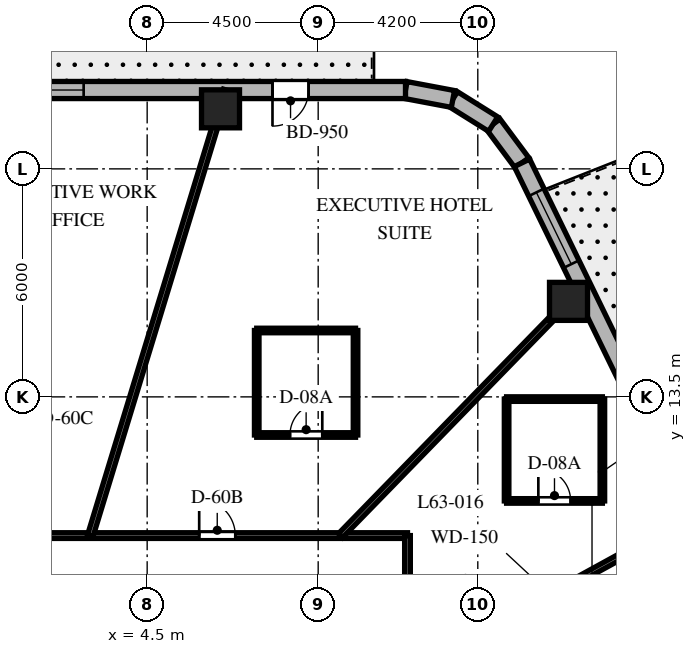
"""IFC4 building model, lengths in metres.
Left out: names, types, materials, properties, quantities, classifications, styles, units other than length and angle.
Written with IfcOpenShell. Run it as: python <this file> out.ifc"""

import sys

from ifc_helpers import new_model, si_unit, direction, frame, frame_2d, origin, origin_2d, place, context, subcontext, project, spatial, rectangle, extrude, element, fill, save


model = new_model("IFC4")
c1 = context("Model", 3, precision=1e-05, world=origin(), true_north=direction((0.0, 1.0)))
c2 = subcontext(c1, "Body", "Model", "MODEL_VIEW")
j1 = project(units=[si_unit("LENGTHUNIT", "METRE"), si_unit("PLANEANGLEUNIT", "RADIAN")], contexts=[c1])
p1 = place(None, origin())
s1 = spatial("IfcSite", under=j1, at=p1, CompositionType="ELEMENT")
p2 = place(p1, origin())
s2 = spatial("IfcBuilding", under=s1, at=p2, CompositionType="ELEMENT")
p3 = place(p2, frame((0.0, 0.0, 252.1)))
s3 = spatial("IfcBuildingStorey", under=s2, at=p3, CompositionType="ELEMENT", Elevation=252.1)
for number, where, z_axis, x_axis in (
    (1, (15.587, 16.013, 0.0), (0.0, 0.0, 1.0), (1.0, 0.0, 0.0)),
    (2, (6.43, 21.08, 0.0), (0.0, 0.0, 1.0), (1.0, 0.0, 0.0)),
):
    element("IfcColumn", number, at=place(p3, frame(where, z_axis=z_axis, x_axis=x_axis)), inside=s3, PredefinedType="COLUMN", context=c2, shape_type="SweptSolid", body=[
        extrude(rectangle(XDim=1.0, YDim=1.0, at=origin_2d()), origin(), (0.0, 0.0, 1.0), 3.8),
    ])
p4 = place(p3, frame((14.362, 19.658, 0.0), z_axis=(0.0, 0.0, 1.0), x_axis=(-0.596642462792, 0.80250717853, 0.0)))
e3 = element("IfcWall", 3, at=p4, inside=s3, PredefinedType="SOLIDWALL", context=c2, shape_type="SweptSolid", body=[
    extrude(rectangle(XDim=1.27, YDim=0.45, at=frame_2d((0.635, 0.0))), origin(), (0.0, 0.0, 1.0), 3.48),
])
p5 = place(p3, frame((13.604, 20.678, 0.0), z_axis=(0.0, 0.0, 1.0), x_axis=(-0.847910404124, 0.53013955387, 0.0)))
e4 = element("IfcWall", 4, at=p5, inside=s3, PredefinedType="SOLIDWALL", context=c2, shape_type="SweptSolid", body=[
    extrude(rectangle(XDim=1.249, YDim=0.45, at=frame_2d((0.624, 0.0))), origin(), (0.0, 0.0, 1.0), 3.48),
])
p6 = place(p3, frame((12.546, 21.34, 0.0), z_axis=(0.0, 0.0, 1.0), x_axis=(-0.982686750835, 0.18527479519, 0.0)))
e5 = element("IfcWall", 5, at=p6, inside=s3, PredefinedType="SOLIDWALL", context=c2, shape_type="SweptSolid", body=[
    extrude(rectangle(XDim=1.27, YDim=0.45, at=frame_2d((0.635, 0.0))), origin(), (0.0, 0.0, 1.0), 3.48),
])
p7 = place(p3, frame((22.74, 2.452, 0.0), z_axis=(0.0, 0.0, 1.0), x_axis=(-0.437753424814, 0.899095066755, 0.0)))
e6 = element("IfcWall", 6, at=p7, inside=s3, PredefinedType="SOLIDWALL", context=c2, shape_type="SweptSolid", body=[
    extrude(rectangle(XDim=19.137, YDim=0.45, at=frame_2d((9.569, 0.0))), origin(), (0.0, 0.0, 1.0), 3.48),
])
p8 = place(p7, frame((4.763, 0.0, 0.0)))
e7 = element("IfcOpeningElement", 7, at=p8, cuts=e6, PredefinedType="OPENING", context=c2, shape_type="SweptSolid", body=[
    extrude(rectangle(XDim=1.0, YDim=2.15, at=frame_2d((0.5, 1.075))), frame((0.0, 0.235, 0.0), z_axis=(0.0, -1.0, 0.0), x_axis=(1.0, 0.0, 0.0)), (0.0, 0.0, 1.0), 0.47),
])
p9 = place(p7, frame((6.611, 0.0, 0.8)))
e8 = element("IfcOpeningElement", 8, at=p9, cuts=e6, PredefinedType="OPENING", context=c2, shape_type="SweptSolid", body=[
    extrude(rectangle(XDim=1.2, YDim=1.8, at=frame_2d((0.6, 0.9))), frame((0.0, 0.235, 0.0), z_axis=(0.0, -1.0, 0.0), x_axis=(1.0, 0.0, 0.0)), (0.0, 0.0, 1.0), 0.47),
])
p10 = place(p7, frame((10.856, 0.0, 0.8)))
e9 = element("IfcOpeningElement", 9, at=p10, cuts=e6, PredefinedType="OPENING", context=c2, shape_type="SweptSolid", body=[
    extrude(rectangle(XDim=2.1, YDim=1.85, at=frame_2d((1.05, 0.925))), frame((0.0, 0.235, 0.0), z_axis=(0.0, -1.0, 0.0), x_axis=(1.0, 0.0, 0.0)), (0.0, 0.0, 1.0), 0.47),
])
p11 = place(p7, frame((16.173, 0.0, 0.8)))
e10 = element("IfcOpeningElement", 10, at=p11, cuts=e6, PredefinedType="OPENING", context=c2, shape_type="SweptSolid", body=[
    extrude(rectangle(XDim=2.1, YDim=1.85, at=frame_2d((1.05, 0.925))), frame((0.0, 0.235, 0.0), z_axis=(0.0, -1.0, 0.0), x_axis=(1.0, 0.0, 0.0)), (0.0, 0.0, 1.0), 0.47),
])
p12 = place(p7, frame((0.916, 0.0, 0.8)))
e11 = element("IfcOpeningElement", 11, at=p12, cuts=e6, PredefinedType="OPENING", context=c2, shape_type="SweptSolid", body=[
    extrude(rectangle(XDim=2.1, YDim=1.85, at=frame_2d((1.05, 0.925))), frame((0.0, 0.235, 0.0), z_axis=(0.0, -1.0, 0.0), x_axis=(1.0, 0.0, 0.0)), (0.0, 0.0, 1.0), 0.47),
])
p13 = place(p3, frame((11.298, 21.575, 0.0), z_axis=(0.0, 0.0, 1.0), x_axis=(-1.0, 0.0, 0.0)))
e12 = element("IfcWall", 12, at=p13, inside=s3, PredefinedType="SOLIDWALL", context=c2, shape_type="SweptSolid", body=[
    extrude(rectangle(XDim=24.399, YDim=0.45, at=frame_2d((12.2, 0.0))), origin(), (0.0, 0.0, 1.0), 3.48),
])
p14 = place(p13, frame((2.55, 0.0, 0.0)))
e13 = element("IfcOpeningElement", 13, at=p14, cuts=e12, PredefinedType="OPENING", context=c2, shape_type="SweptSolid", body=[
    extrude(rectangle(XDim=0.95, YDim=2.15, at=frame_2d((0.475, 1.075))), frame((0.0, 0.235, 0.0), z_axis=(0.0, -1.0, 0.0), x_axis=(1.0, 0.0, 0.0)), (0.0, 0.0, 1.0), 0.47),
])
p15 = place(p13, frame((8.469, 0.0, 0.8)))
e14 = element("IfcOpeningElement", 14, at=p15, cuts=e12, PredefinedType="OPENING", context=c2, shape_type="SweptSolid", body=[
    extrude(rectangle(XDim=1.5, YDim=1.8, at=frame_2d((0.75, 0.9))), frame((0.0, 0.235, 0.0), z_axis=(0.0, -1.0, 0.0), x_axis=(1.0, 0.0, 0.0)), (0.0, 0.0, 1.0), 0.47),
])
p16 = place(p13, frame((15.222, 0.0, 0.8)))
e15 = element("IfcOpeningElement", 15, at=p16, cuts=e12, PredefinedType="OPENING", context=c2, shape_type="SweptSolid", body=[
    extrude(rectangle(XDim=1.5, YDim=1.8, at=frame_2d((0.75, 0.9))), frame((0.0, 0.235, 0.0), z_axis=(0.0, -1.0, 0.0), x_axis=(1.0, 0.0, 0.0)), (0.0, 0.0, 1.0), 0.47),
])
p17 = place(p13, frame((21.296, 0.0, 0.8)))
e16 = element("IfcOpeningElement", 16, at=p17, cuts=e12, PredefinedType="OPENING", context=c2, shape_type="SweptSolid", body=[
    extrude(rectangle(XDim=1.5, YDim=1.8, at=frame_2d((0.75, 0.9))), frame((0.0, 0.235, 0.0), z_axis=(0.0, -1.0, 0.0), x_axis=(1.0, 0.0, 0.0)), (0.0, 0.0, 1.0), 0.47),
])
p18 = place(p3, frame((0.92, 9.85, 0.0), z_axis=(0.0, 0.0, 1.0), x_axis=(1.0, 0.0, 0.0)))
e17 = element("IfcWall", 17, at=p18, inside=s3, PredefinedType="PARTITIONING", context=c2, shape_type="SweptSolid", body=[
    extrude(rectangle(XDim=10.43, YDim=0.15, at=frame_2d((5.215, 0.0))), origin(), (0.0, 0.0, 1.0), 2.97),
])
p19 = place(p18, frame((4.949, 0.0, 0.0)))
e18 = element("IfcOpeningElement", 18, at=p19, cuts=e17, PredefinedType="OPENING", context=c2, shape_type="SweptSolid", body=[
    extrude(rectangle(XDim=0.95, YDim=2.03, at=frame_2d((0.475, 1.015))), frame((0.0, 0.085, 0.0), z_axis=(0.0, -1.0, 0.0), x_axis=(1.0, 0.0, 0.0)), (0.0, 0.0, 1.0), 0.17),
])
p20 = place(p3, frame((11.35, 9.85, 0.0), z_axis=(0.0, 0.0, 1.0), x_axis=(0.0, -1.0, 0.0)))
e19 = element("IfcWall", 19, at=p20, inside=s3, PredefinedType="PARTITIONING", context=c2, shape_type="SweptSolid", body=[
    extrude(rectangle(XDim=12.4, YDim=0.15, at=frame_2d((6.2, 0.0))), origin(), (0.0, 0.0, 1.0), 2.97),
])
p21 = place(p20, frame((4.709, 0.0, 0.0)))
e20 = element("IfcOpeningElement", 20, at=p21, cuts=e19, PredefinedType="OPENING", context=c2, shape_type="SweptSolid", body=[
    extrude(rectangle(XDim=0.9, YDim=2.03, at=frame_2d((0.45, 1.015))), frame((0.0, 0.085, 0.0), z_axis=(0.0, -1.0, 0.0), x_axis=(1.0, 0.0, 0.0)), (0.0, 0.0, 1.0), 0.17),
])
p22 = place(p20, frame((1.457, 0.0, 0.0)))
e21 = element("IfcOpeningElement", 21, at=p22, cuts=e19, PredefinedType="OPENING", context=c2, shape_type="SweptSolid", body=[
    extrude(rectangle(XDim=0.95, YDim=2.03, at=frame_2d((0.475, 1.015))), frame((0.0, 0.085, 0.0), z_axis=(0.0, -1.0, 0.0), x_axis=(1.0, 0.0, 0.0)), (0.0, 0.0, 1.0), 0.17),
])
p23 = place(p20, frame((8.835, 0.0, 0.0)))
e22 = element("IfcOpeningElement", 22, at=p23, cuts=e19, PredefinedType="OPENING", context=c2, shape_type="SweptSolid", body=[
    extrude(rectangle(XDim=0.95, YDim=2.03, at=frame_2d((0.475, 1.015))), frame((0.0, 0.085, 0.0), z_axis=(0.0, -1.0, 0.0), x_axis=(1.0, 0.0, 0.0)), (0.0, 0.0, 1.0), 0.17),
])
p24 = place(p3, frame((11.35, 6.227, 0.0), z_axis=(0.0, 0.0, 1.0), x_axis=(0.876723190824, 0.480995266786, 0.0)))
e23 = element("IfcWall", 23, at=p24, inside=s3, PredefinedType="PARTITIONING", context=c2, shape_type="SweptSolid", body=[
    extrude(rectangle(XDim=8.598, YDim=0.15, at=frame_2d((4.299, 0.0))), origin(), (0.0, 0.0, 1.0), 2.72),
])
p25 = place(p3, frame((9.588, 9.85, 0.0), z_axis=(0.0, 0.0, 1.0), x_axis=(0.697519469595, 0.716565830567, 0.0)))
e24 = element("IfcWall", 24, at=p25, inside=s3, PredefinedType="PARTITIONING", context=c2, shape_type="SweptSolid", body=[
    extrude(rectangle(XDim=9.126, YDim=0.15, at=frame_2d((4.563, 0.0))), origin(), (0.0, 0.0, 1.0), 2.72),
])
p26 = place(p3, frame((3.004, 9.85, 0.0), z_axis=(0.0, 0.0, 1.0), x_axis=(0.291775760688, 0.956486751333, 0.0)))
e25 = element("IfcWall", 25, at=p26, inside=s3, PredefinedType="PARTITIONING", context=c2, shape_type="SweptSolid", body=[
    extrude(rectangle(XDim=12.258, YDim=0.15, at=frame_2d((6.129, 0.0))), origin(), (0.0, 0.0, 1.0), 2.72),
])
p27 = place(p3, frame((13.958, 10.762, 0.0), z_axis=(0.0, 0.0, 1.0), x_axis=(1.0, 0.0, 0.0)))
e26 = element("IfcWall", 26, at=p27, inside=s3, PredefinedType="PARTITIONING", context=c2, shape_type="SweptSolid", body=[
    extrude(rectangle(XDim=2.52, YDim=0.12, at=frame_2d((1.26, 0.0))), origin(), (0.0, 0.0, 1.0), 3.006),
])
p28 = place(p27, frame((0.835, 0.0, 0.0)))
e27 = element("IfcOpeningElement", 27, at=p28, cuts=e26, PredefinedType="OPENING", context=c2, shape_type="SweptSolid", body=[
    extrude(rectangle(XDim=0.85, YDim=2.03, at=frame_2d((0.425, 1.015))), frame((0.0, 0.07, 0.0), z_axis=(0.0, -1.0, 0.0), x_axis=(1.0, 0.0, 0.0)), (0.0, 0.0, 1.0), 0.14),
])
p29 = place(p3, frame((16.478, 10.762, 0.0), z_axis=(0.0, 0.0, 1.0), x_axis=(0.0, 1.0, 0.0)))
e28 = element("IfcWall", 28, at=p29, inside=s3, PredefinedType="PARTITIONING", context=c2, shape_type="SweptSolid", body=[
    extrude(rectangle(XDim=2.68, YDim=0.12, at=frame_2d((1.34, 0.0))), origin(), (0.0, 0.0, 1.0), 3.48),
])
p30 = place(p3, frame((16.478, 13.442, 0.0), z_axis=(0.0, 0.0, 1.0), x_axis=(-1.0, 0.0, 0.0)))
e29 = element("IfcWall", 29, at=p30, inside=s3, PredefinedType="PARTITIONING", context=c2, shape_type="SweptSolid", body=[
    extrude(rectangle(XDim=2.52, YDim=0.12, at=frame_2d((1.26, 0.0))), origin(), (0.0, 0.0, 1.0), 3.48),
])
p31 = place(p3, frame((13.958, 13.442, 0.0), z_axis=(0.0, 0.0, 1.0), x_axis=(0.0, -1.0, 0.0)))
e30 = element("IfcWall", 30, at=p31, inside=s3, PredefinedType="PARTITIONING", context=c2, shape_type="SweptSolid", body=[
    extrude(rectangle(XDim=2.68, YDim=0.12, at=frame_2d((1.34, 0.0))), origin(), (0.0, 0.0, 1.0), 3.006),
])
p32 = place(p3, frame((7.383, 12.497, 0.0), z_axis=(0.0, 0.0, 1.0), x_axis=(1.0, 0.0, 0.0)))
e31 = element("IfcWall", 31, at=p32, inside=s3, PredefinedType="PARTITIONING", context=c2, shape_type="SweptSolid", body=[
    extrude(rectangle(XDim=2.6, YDim=0.12, at=frame_2d((1.3, 0.0))), origin(), (0.0, 0.0, 1.0), 2.92),
])
p33 = place(p32, frame((0.875, 0.0, 0.0)))
e32 = element("IfcOpeningElement", 32, at=p33, cuts=e31, PredefinedType="OPENING", context=c2, shape_type="SweptSolid", body=[
    extrude(rectangle(XDim=0.85, YDim=2.03, at=frame_2d((0.425, 1.015))), frame((0.0, 0.07, 0.0), z_axis=(0.0, -1.0, 0.0), x_axis=(1.0, 0.0, 0.0)), (0.0, 0.0, 1.0), 0.14),
])
p34 = place(p3, frame((9.983, 12.497, 0.0), z_axis=(0.0, 0.0, 1.0), x_axis=(0.0, 1.0, 0.0)))
e33 = element("IfcWall", 33, at=p34, inside=s3, PredefinedType="PARTITIONING", context=c2, shape_type="SweptSolid", body=[
    extrude(rectangle(XDim=2.75, YDim=0.12, at=frame_2d((1.375, 0.0))), origin(), (0.0, 0.0, 1.0), 3.052),
])
p35 = place(p3, frame((9.983, 15.247, 0.0), z_axis=(0.0, 0.0, 1.0), x_axis=(-1.0, 0.0, 0.0)))
e34 = element("IfcWall", 34, at=p35, inside=s3, PredefinedType="PARTITIONING", context=c2, shape_type="SweptSolid", body=[
    extrude(rectangle(XDim=2.6, YDim=0.12, at=frame_2d((1.3, 0.0))), origin(), (0.0, 0.0, 1.0), 3.052),
])
p36 = place(p3, frame((7.383, 15.247, 0.0), z_axis=(0.0, 0.0, 1.0), x_axis=(0.0, -1.0, 0.0)))
e35 = element("IfcWall", 35, at=p36, inside=s3, PredefinedType="PARTITIONING", context=c2, shape_type="SweptSolid", body=[
    extrude(rectangle(XDim=2.75, YDim=0.12, at=frame_2d((1.375, 0.0))), origin(), (0.0, 0.0, 1.0), 2.92),
])
p37 = place(p11, origin())
e36 = element("IfcWindow", 36, at=p37, inside=s3, PartitioningType="SINGLE_PANEL", PredefinedType="WINDOW", context=c2, shape_type="SweptSolid", body=[
    extrude(rectangle(XDim=2.1, YDim=1.85, at=frame_2d((1.05, 0.925))), frame((0.0, 0.03, 0.0), z_axis=(0.0, -1.0, 0.0), x_axis=(1.0, 0.0, 0.0)), (0.0, 0.0, 1.0), 0.06),
])
fill(e10, e36)
p38 = place(p14, origin())
e37 = element("IfcDoor", 37, at=p38, inside=s3, OperationType="SINGLE_SWING_RIGHT", PredefinedType="DOOR", context=c2, shape_type="SweptSolid", body=[
    extrude(rectangle(XDim=0.95, YDim=2.15, at=frame_2d((0.475, 1.075))), frame((0.0, 0.025, 0.0), z_axis=(0.0, -1.0, 0.0), x_axis=(1.0, 0.0, 0.0)), (0.0, 0.0, 1.0), 0.05),
])
fill(e13, e37)
p39 = place(p15, origin())
e38 = element("IfcWindow", 38, at=p39, inside=s3, PartitioningType="SINGLE_PANEL", PredefinedType="WINDOW", context=c2, shape_type="SweptSolid", body=[
    extrude(rectangle(XDim=1.5, YDim=1.8, at=frame_2d((0.75, 0.9))), frame((0.0, 0.03, 0.0), z_axis=(0.0, -1.0, 0.0), x_axis=(1.0, 0.0, 0.0)), (0.0, 0.0, 1.0), 0.06),
])
fill(e14, e38)
p40 = place(p28, origin())
e39 = element("IfcDoor", 39, at=p40, inside=s3, OperationType="SINGLE_SWING_LEFT", PredefinedType="DOOR", context=c2, shape_type="SweptSolid", body=[
    extrude(rectangle(XDim=0.85, YDim=2.03, at=frame_2d((0.425, 1.015))), frame((0.0, 0.025, 0.0), z_axis=(0.0, -1.0, 0.0), x_axis=(1.0, 0.0, 0.0)), (0.0, 0.0, 1.0), 0.05),
])
fill(e27, e39)
p41 = place(p19, origin())
e40 = element("IfcDoor", 40, at=p41, inside=s3, OperationType="SINGLE_SWING_LEFT", PredefinedType="DOOR", context=c2, shape_type="SweptSolid", body=[
    extrude(rectangle(XDim=0.95, YDim=2.03, at=frame_2d((0.475, 1.015))), frame((0.0, 0.025, 0.0), z_axis=(0.0, -1.0, 0.0), x_axis=(1.0, 0.0, 0.0)), (0.0, 0.0, 1.0), 0.05),
])
fill(e18, e40)
p42 = place(p33, origin())
e41 = element("IfcDoor", 41, at=p42, inside=s3, OperationType="SINGLE_SWING_RIGHT", PredefinedType="DOOR", context=c2, shape_type="SweptSolid", body=[
    extrude(rectangle(XDim=0.85, YDim=2.03, at=frame_2d((0.425, 1.015))), frame((0.0, 0.025, 0.0), z_axis=(0.0, -1.0, 0.0), x_axis=(1.0, 0.0, 0.0)), (0.0, 0.0, 1.0), 0.05),
])
fill(e32, e41)
save(model, sys.argv[1])
